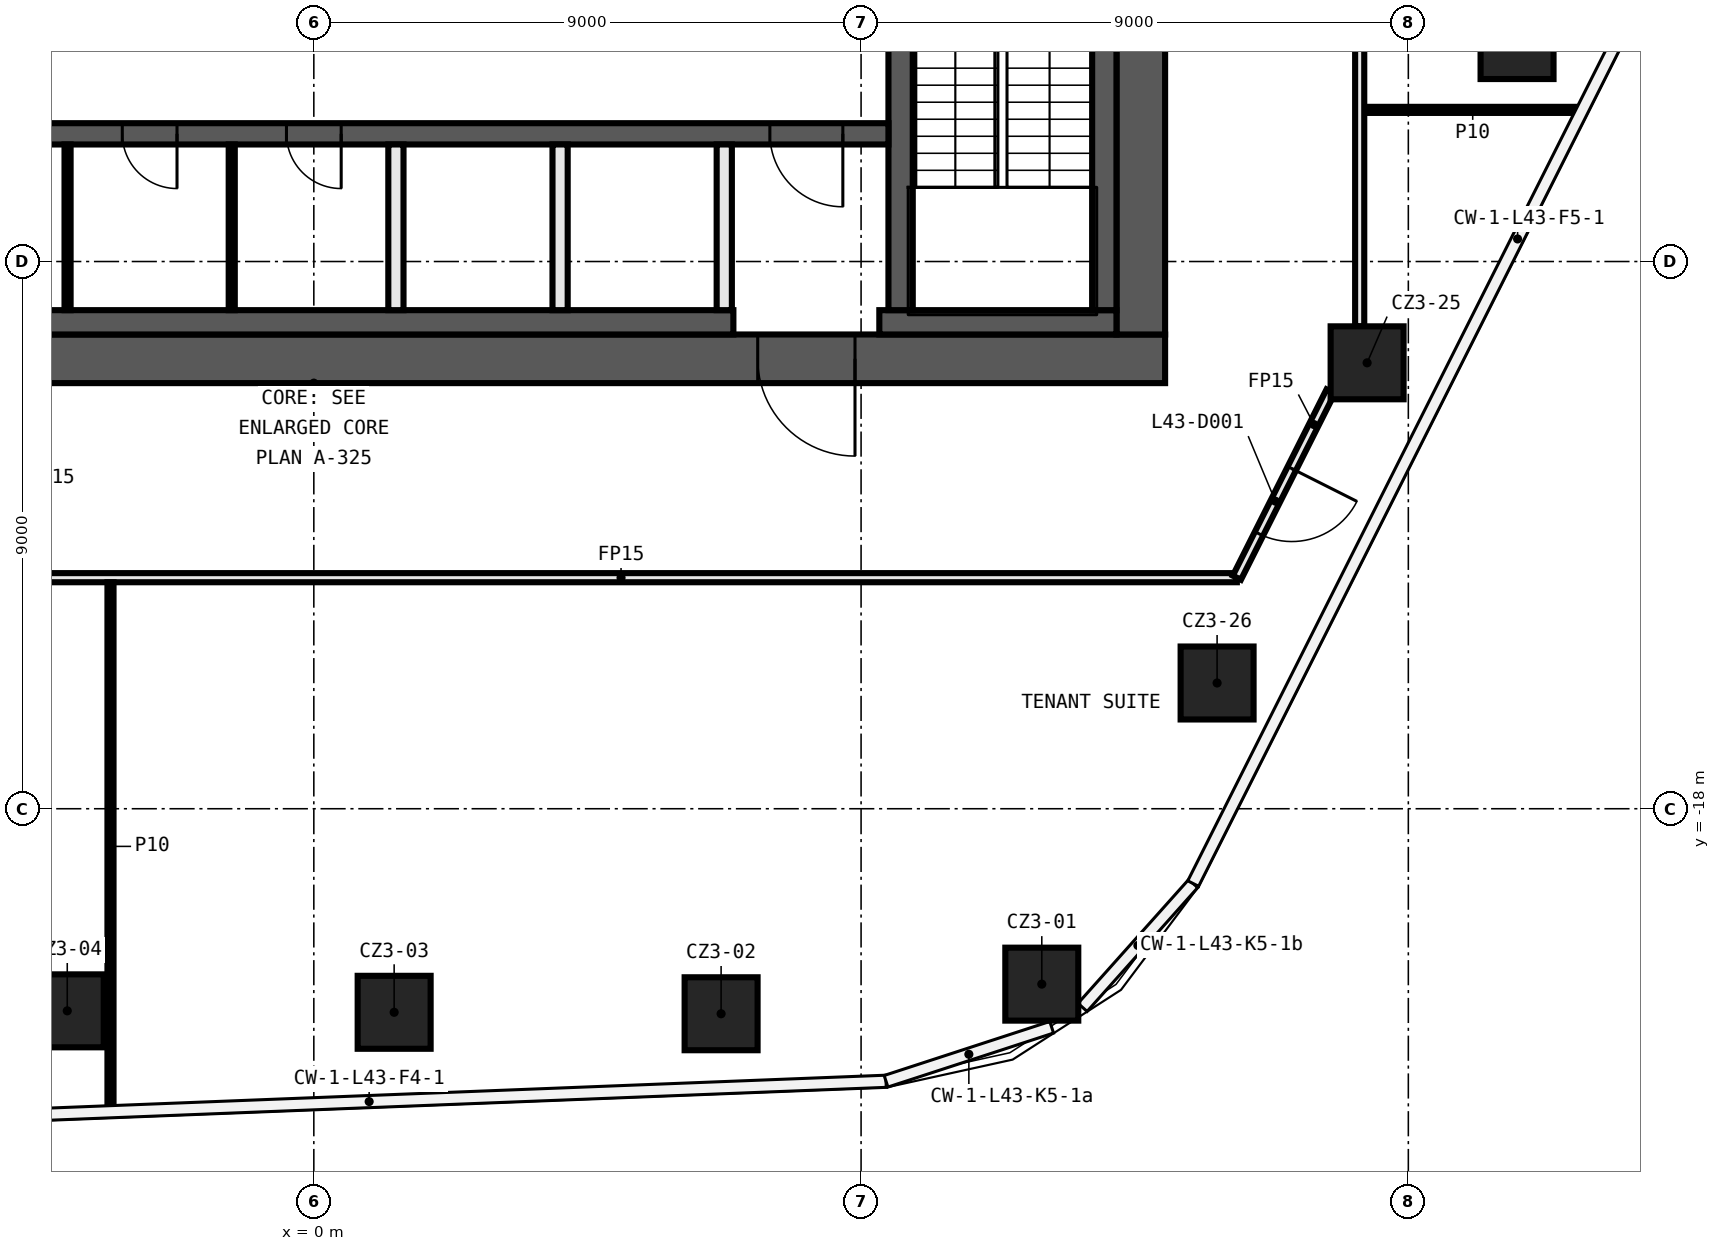
"""IFC4 building model, lengths in metres.
Left out: names, types, materials, properties, quantities, classifications, styles, units other than length and angle.
Written with IfcOpenShell. Run it as: python <this file> out.ifc"""

import sys

from ifc_helpers import new_model, si_unit, direction, frame, frame_2d, origin, origin_2d, place, context, subcontext, project, spatial, rectangle, extrude, element, fill, save


model = new_model("IFC4")
c1 = context("Model", 3, precision=1e-05, world=origin(), true_north=direction((0.0, 1.0)))
c2 = subcontext(c1, "Body", "Model", "MODEL_VIEW")
j1 = project(units=[si_unit("LENGTHUNIT", "METRE"), si_unit("PLANEANGLEUNIT", "RADIAN")], contexts=[c1])
p1 = place(None, origin())
s1 = spatial("IfcSite", under=j1, at=p1, CompositionType="ELEMENT")
p2 = place(p1, origin())
s2 = spatial("IfcBuilding", under=s1, at=p2, CompositionType="ELEMENT")
p3 = place(p2, frame((0.0, 0.0, 207.2)))
s3 = spatial("IfcBuildingStorey", under=s2, at=p3, CompositionType="ELEMENT", Elevation=207.2)
for number, where, z_axis, x_axis in (
    (1, (11.972, -20.885, 0.0), (0.0, 0.0, 1.0), (1.0, 0.0, 0.0)),
    (2, (6.698, -21.372, 0.0), (0.0, 0.0, 1.0), (1.0, 0.0, 0.0)),
    (3, (1.321, -21.348, 0.0), (0.0, 0.0, 1.0), (1.0, 0.0, 0.0)),
    (4, (-4.055, -21.324, 0.0), (0.0, 0.0, 1.0), (1.0, 0.0, 0.0)),
    (5, (19.788, -5.399, 0.0), (0.0, 0.0, 1.0), (1.0, 0.0, 0.0)),
    (6, (17.322, -10.666, 0.0), (0.0, 0.0, 1.0), (1.0, 0.0, 0.0)),
    (7, (14.855, -15.932, 0.0), (0.0, 0.0, 1.0), (1.0, 0.0, 0.0)),
):
    element("IfcColumn", number, at=place(p3, frame(where, z_axis=z_axis, x_axis=x_axis)), inside=s3, PredefinedType="COLUMN", context=c2, shape_type="SweptSolid", body=[
        extrude(rectangle(XDim=1.2, YDim=1.2, at=origin_2d()), origin(), (0.0, 0.0, 1.0), 3.82),
    ])
p4 = place(p3, frame((-5.075, -14.2, 0.0), z_axis=(0.0, 0.0, 1.0), x_axis=(1.0, 0.0, 0.0)))
e8 = element("IfcWall", 8, at=p4, inside=s3, PredefinedType="PARTITIONING", context=c2, shape_type="SweptSolid", body=[
    extrude(rectangle(XDim=20.255, YDim=0.15, at=frame_2d((10.127, 0.0))), origin(), (0.0, 0.0, 1.0), 3.82),
])
p5 = place(p3, frame((17.275, -6.506, 0.0), z_axis=(0.0, 0.0, 1.0), x_axis=(1.0, 0.0, 0.0)))
e9 = element("IfcWall", 9, at=p5, inside=s3, PredefinedType="PARTITIONING", context=c2, shape_type="SweptSolid", body=[
    extrude(rectangle(XDim=3.568, YDim=0.1, at=frame_2d((1.784, 0.0))), origin(), (0.0, 0.0, 1.0), 3.82),
])
p6 = place(p3, frame((16.722, -11.136, 0.0), z_axis=(0.0, 0.0, 1.0), x_axis=(-0.449461267312, -0.893299820433, 0.0)))
e10 = element("IfcWall", 10, at=p6, inside=s3, PredefinedType="PARTITIONING", context=c2, shape_type="SweptSolid", body=[
    extrude(rectangle(XDim=3.43, YDim=0.15, at=frame_2d((1.715, 0.0))), origin(), (0.0, 0.0, 1.0), 3.82),
])
p7 = place(p6, frame((1.421, 0.0, 0.0)))
e11 = element("IfcOpeningElement", 11, at=p7, cuts=e10, PredefinedType="OPENING", context=c2, shape_type="SweptSolid", body=[
    extrude(rectangle(XDim=1.2, YDim=2.1, at=frame_2d((0.6, 1.05))), frame((0.0, 0.085, 0.0), z_axis=(0.0, -1.0, 0.0), x_axis=(1.0, 0.0, 0.0)), (0.0, 0.0, 1.0), 0.17),
])
p8 = place(p3, frame((17.2, 13.106, 0.0), z_axis=(0.0, 0.0, 1.0), x_axis=(0.0, -1.0, 0.0)))
e12 = element("IfcWall", 12, at=p8, inside=s3, PredefinedType="PARTITIONING", context=c2, shape_type="SweptSolid", body=[
    extrude(rectangle(XDim=23.172, YDim=0.15, at=frame_2d((11.586, 0.0))), origin(), (0.0, 0.0, 1.0), 3.82),
])
p9 = place(p8, frame((4.412, 0.0, 0.0)))
e13 = element("IfcOpeningElement", 13, at=p9, cuts=e12, PredefinedType="OPENING", context=c2, shape_type="SweptSolid", body=[
    extrude(rectangle(XDim=1.2, YDim=2.1, at=frame_2d((0.6, 1.05))), frame((0.0, 0.085, 0.0), z_axis=(0.0, -1.0, 0.0), x_axis=(1.0, 0.0, 0.0)), (0.0, 0.0, 1.0), 0.17),
])
p10 = place(p3, frame((-3.344, -22.964, 0.0), z_axis=(0.0, 0.0, 1.0), x_axis=(0.0, 1.0, 0.0)))
e14 = element("IfcWall", 14, at=p10, inside=s3, PredefinedType="PARTITIONING", context=c2, shape_type="SweptSolid", body=[
    extrude(rectangle(XDim=8.689, YDim=0.1, at=frame_2d((4.344, 0.0))), origin(), (0.0, 0.0, 1.0), 3.82),
])
p11 = place(p3, frame((14.0, -10.6, 0.0), z_axis=(0.0, 0.0, 1.0), x_axis=(-1.0, 0.0, 0.0)))
e15 = element("IfcWall", 15, at=p11, inside=s3, PredefinedType="SHEAR", context=c2, shape_type="SweptSolid", body=[
    extrude(rectangle(XDim=28.0, YDim=0.8, at=frame_2d((14.0, 0.0))), origin(), (0.0, 0.0, 1.0), 3.82),
])
p12 = place(p11, frame((5.1, 0.0, 0.0)))
e16 = element("IfcOpeningElement", 16, at=p12, cuts=e15, PredefinedType="OPENING", context=c2, shape_type="SweptSolid", body=[
    extrude(rectangle(XDim=1.6, YDim=2.1, at=frame_2d((0.8, 1.05))), frame((0.0, 0.41, 0.0), z_axis=(0.0, -1.0, 0.0), x_axis=(1.0, 0.0, 0.0)), (0.0, 0.0, 1.0), 0.82),
])
p13 = place(p3, frame((13.6, 10.2, 0.0), z_axis=(0.0, 0.0, 1.0), x_axis=(0.0, -1.0, 0.0)))
e17 = element("IfcWall", 17, at=p13, inside=s3, PredefinedType="SHEAR", context=c2, shape_type="SweptSolid", body=[
    extrude(rectangle(XDim=20.4, YDim=0.8, at=frame_2d((10.2, 0.0))), origin(), (0.0, 0.0, 1.0), 3.82),
])
p14 = place(p3, frame((13.2, -10.0, 0.0), z_axis=(0.0, 0.0, 1.0), x_axis=(-1.0, 0.0, 0.0)))
e18 = element("IfcWall", 18, at=p14, inside=s3, PredefinedType="SHEAR", context=c2, shape_type="SweptSolid", body=[
    extrude(rectangle(XDim=3.9, YDim=0.4, at=frame_2d((1.95, 0.0))), origin(), (0.0, 0.0, 1.0), 3.82),
])
p15 = place(p3, frame((6.9, -10.0, 0.0), z_axis=(0.0, 0.0, 1.0), x_axis=(-1.0, 0.0, 0.0)))
e19 = element("IfcWall", 19, at=p15, inside=s3, PredefinedType="SHEAR", context=c2, shape_type="SweptSolid", body=[
    extrude(rectangle(XDim=20.1, YDim=0.4, at=frame_2d((10.05, 0.0))), origin(), (0.0, 0.0, 1.0), 3.82),
])
p16 = place(p3, frame((13.0, 9.8, 0.0), z_axis=(0.0, 0.0, 1.0), x_axis=(0.0, -1.0, 0.0)))
e20 = element("IfcWall", 20, at=p16, inside=s3, PredefinedType="SHEAR", context=c2, shape_type="SweptSolid", body=[
    extrude(rectangle(XDim=19.6, YDim=0.4, at=frame_2d((9.8, 0.0))), origin(), (0.0, 0.0, 1.0), 3.82),
])
p17 = place(p3, frame((9.65, -2.3, 0.0), z_axis=(0.0, 0.0, 1.0), x_axis=(0.0, -1.0, 0.0)))
e21 = element("IfcWall", 21, at=p17, inside=s3, PredefinedType="SHEAR", context=c2, shape_type="SweptSolid", body=[
    extrude(rectangle(XDim=7.5, YDim=0.4, at=frame_2d((3.75, 0.0))), origin(), (0.0, 0.0, 1.0), 3.82),
])
p18 = place(p17, frame((1.2, 0.0, 0.0)))
e22 = element("IfcOpeningElement", 22, at=p18, cuts=e21, PredefinedType="OPENING", context=c2, shape_type="SweptSolid", body=[
    extrude(rectangle(XDim=1.2, YDim=2.1, at=frame_2d((0.6, 1.05))), frame((0.0, 0.21, 0.0), z_axis=(0.0, -1.0, 0.0), x_axis=(1.0, 0.0, 0.0)), (0.0, 0.0, 1.0), 0.42),
])
p19 = place(p3, frame((9.45, -6.9, 0.0), z_axis=(0.0, 0.0, 1.0), x_axis=(-1.0, 0.0, 0.0)))
e23 = element("IfcWall", 23, at=p19, inside=s3, PredefinedType="SHEAR", context=c2, shape_type="SweptSolid", body=[
    extrude(rectangle(XDim=18.9, YDim=0.35, at=frame_2d((9.45, 0.0))), origin(), (0.0, 0.0, 1.0), 3.82),
])
p20 = place(p19, frame((0.75, 0.0, 0.0)))
e24 = element("IfcOpeningElement", 24, at=p20, cuts=e23, PredefinedType="OPENING", context=c2, shape_type="SweptSolid", body=[
    extrude(rectangle(XDim=1.2, YDim=2.1, at=frame_2d((0.6, 1.05))), frame((0.0, 0.185, 0.0), z_axis=(0.0, -1.0, 0.0), x_axis=(1.0, 0.0, 0.0)), (0.0, 0.0, 1.0), 0.37),
])
p21 = place(p19, frame((17.1, 0.0, 0.0)))
e25 = element("IfcOpeningElement", 25, at=p21, cuts=e23, PredefinedType="OPENING", context=c2, shape_type="SweptSolid", body=[
    extrude(rectangle(XDim=0.9, YDim=2.1, at=frame_2d((0.45, 1.05))), frame((0.0, 0.185, 0.0), z_axis=(0.0, -1.0, 0.0), x_axis=(1.0, 0.0, 0.0)), (0.0, 0.0, 1.0), 0.37),
])
p22 = place(p19, frame((14.4, 0.0, 0.0)))
e26 = element("IfcOpeningElement", 26, at=p22, cuts=e23, PredefinedType="OPENING", context=c2, shape_type="SweptSolid", body=[
    extrude(rectangle(XDim=0.9, YDim=2.1, at=frame_2d((0.45, 1.05))), frame((0.0, 0.185, 0.0), z_axis=(0.0, -1.0, 0.0), x_axis=(1.0, 0.0, 0.0)), (0.0, 0.0, 1.0), 0.37),
])
p23 = place(p19, frame((11.7, 0.0, 0.0)))
e27 = element("IfcOpeningElement", 27, at=p23, cuts=e23, PredefinedType="OPENING", context=c2, shape_type="SweptSolid", body=[
    extrude(rectangle(XDim=0.9, YDim=2.1, at=frame_2d((0.45, 1.05))), frame((0.0, 0.185, 0.0), z_axis=(0.0, -1.0, 0.0), x_axis=(1.0, 0.0, 0.0)), (0.0, 0.0, 1.0), 0.37),
])
p24 = place(p19, frame((9.0, 0.0, 0.0)))
e28 = element("IfcOpeningElement", 28, at=p24, cuts=e23, PredefinedType="OPENING", context=c2, shape_type="SweptSolid", body=[
    extrude(rectangle(XDim=0.9, YDim=2.1, at=frame_2d((0.45, 1.05))), frame((0.0, 0.185, 0.0), z_axis=(0.0, -1.0, 0.0), x_axis=(1.0, 0.0, 0.0)), (0.0, 0.0, 1.0), 0.37),
])
for number, where, z_axis, x_axis in (
    (29, (6.75, -9.8, 0.0), (0.0, 0.0, 1.0), (0.0, 1.0, 0.0)),
    (30, (4.05, -9.8, 0.0), (0.0, 0.0, 1.0), (0.0, 1.0, 0.0)),
    (31, (1.35, -9.8, 0.0), (0.0, 0.0, 1.0), (0.0, 1.0, 0.0)),
):
    element("IfcWall", number, at=place(p3, frame(where, z_axis=z_axis, x_axis=x_axis)), inside=s3, PredefinedType="SOLIDWALL", context=c2, shape_type="SweptSolid", body=[
        extrude(rectangle(XDim=2.725, YDim=0.25, at=frame_2d((1.363, 0.0))), origin(), (0.0, 0.0, 1.0), 3.82),
    ])
for number, where, z_axis, x_axis in (
    (32, (-1.35, -9.8, 0.0), (0.0, 0.0, 1.0), (0.0, 1.0, 0.0)),
    (33, (-4.05, -9.8, 0.0), (0.0, 0.0, 1.0), (0.0, 1.0, 0.0)),
):
    element("IfcWall", number, at=place(p3, frame(where, z_axis=z_axis, x_axis=x_axis)), inside=s3, PredefinedType="PARTITIONING", context=c2, shape_type="SweptSolid", body=[
        extrude(rectangle(XDim=2.725, YDim=0.1, at=frame_2d((1.363, 0.0))), origin(), (0.0, 0.0, 1.0), 3.82),
    ])
p25 = place(p7, origin())
e34 = element("IfcDoor", 34, at=p25, inside=s3, OperationType="SINGLE_SWING_RIGHT", PredefinedType="DOOR", context=c2, shape_type="SweptSolid", body=[
    extrude(rectangle(XDim=1.2, YDim=2.1, at=frame_2d((0.6, 1.05))), frame((0.0, 0.025, 0.0), z_axis=(0.0, -1.0, 0.0), x_axis=(1.0, 0.0, 0.0)), (0.0, 0.0, 1.0), 0.05),
])
fill(e11, e34)
p26 = place(p12, origin())
e35 = element("IfcDoor", 35, at=p26, inside=s3, OperationType="DOUBLE_DOOR_SINGLE_SWING", PredefinedType="DOOR", context=c2, shape_type="SweptSolid", body=[
    extrude(rectangle(XDim=1.6, YDim=2.1, at=frame_2d((0.8, 1.05))), frame((0.0, 0.025, 0.0), z_axis=(0.0, -1.0, 0.0), x_axis=(1.0, 0.0, 0.0)), (0.0, 0.0, 1.0), 0.05),
])
fill(e16, e35)
p27 = place(p20, origin())
e36 = element("IfcDoor", 36, at=p27, inside=s3, OperationType="SINGLE_SWING_LEFT", PredefinedType="DOOR", context=c2, shape_type="SweptSolid", body=[
    extrude(rectangle(XDim=1.2, YDim=2.1, at=frame_2d((0.6, 1.05))), frame((0.0, 0.025, 0.0), z_axis=(0.0, -1.0, 0.0), x_axis=(1.0, 0.0, 0.0)), (0.0, 0.0, 1.0), 0.05),
])
fill(e24, e36)
p28 = place(p23, origin())
e37 = element("IfcDoor", 37, at=p28, inside=s3, OperationType="SINGLE_SWING_LEFT", PredefinedType="DOOR", context=c2, shape_type="SweptSolid", body=[
    extrude(rectangle(XDim=0.9, YDim=2.1, at=frame_2d((0.45, 1.05))), frame((0.0, 0.025, 0.0), z_axis=(0.0, -1.0, 0.0), x_axis=(1.0, 0.0, 0.0)), (0.0, 0.0, 1.0), 0.05),
])
fill(e27, e37)
p29 = place(p24, origin())
e38 = element("IfcDoor", 38, at=p29, inside=s3, OperationType="SINGLE_SWING_RIGHT", PredefinedType="DOOR", context=c2, shape_type="SweptSolid", body=[
    extrude(rectangle(XDim=0.9, YDim=2.1, at=frame_2d((0.45, 1.05))), frame((0.0, 0.025, 0.0), z_axis=(0.0, -1.0, 0.0), x_axis=(1.0, 0.0, 0.0)), (0.0, 0.0, 1.0), 0.05),
])
fill(e28, e38)
save(model, sys.argv[1])
